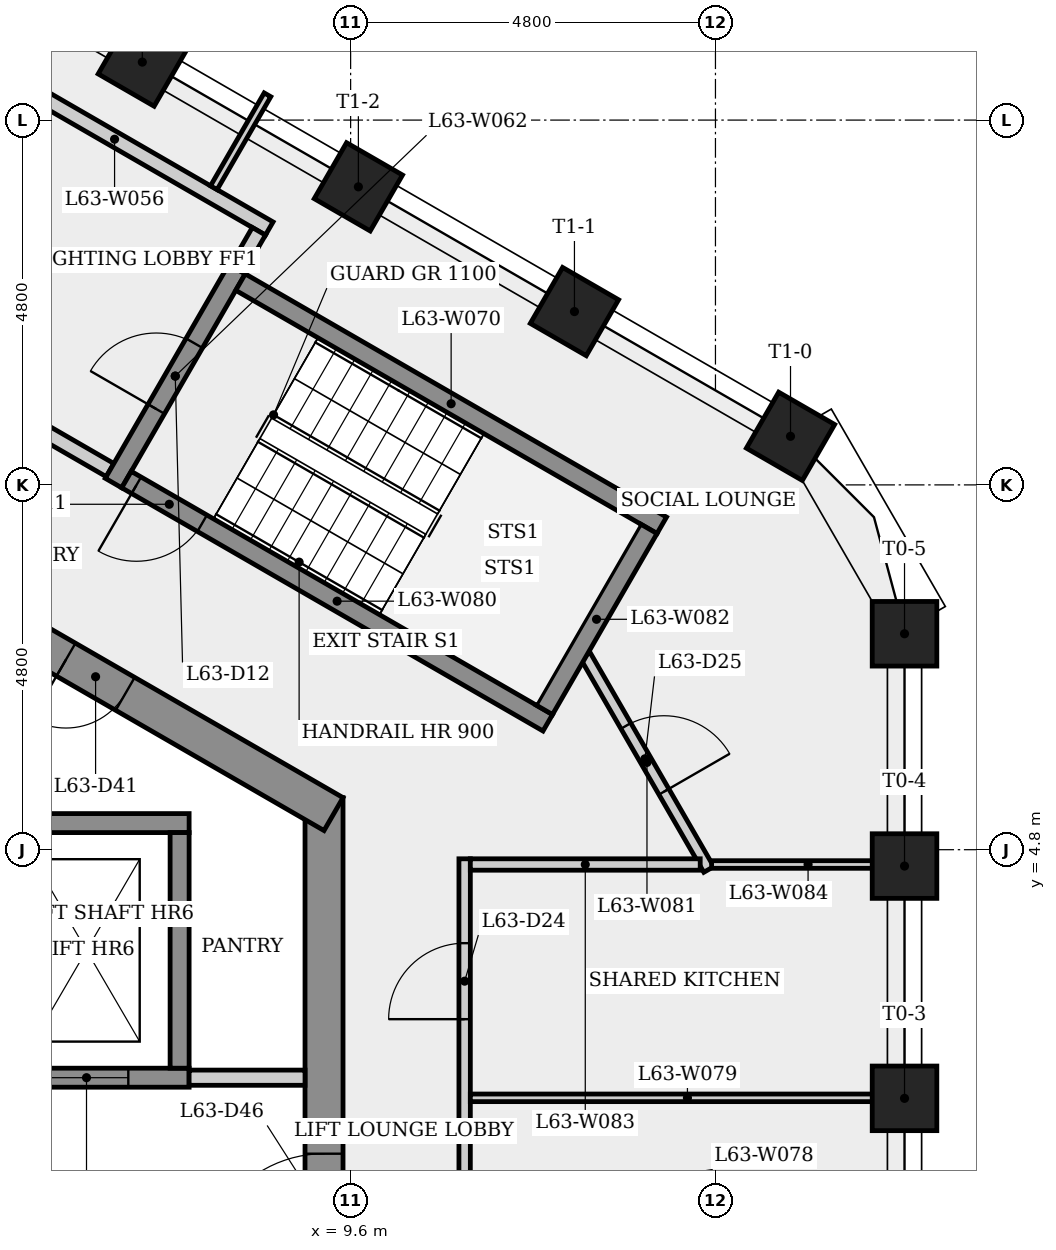
"""IFC4 building model, lengths in metres.
Left out: names, types, materials, properties, quantities, classifications, styles, units other than length and angle.
Written with IfcOpenShell. Run it as: python <this file> out.ifc"""

import sys

from ifc_helpers import new_model, si_unit, direction, frame, frame_2d, origin, origin_2d, place, context, subcontext, project, spatial, rectangle, extrude, element, fill, save


model = new_model("IFC4")
c1 = context("Model", 3, precision=1e-05, world=origin(), true_north=direction((0.0, 1.0)))
c2 = subcontext(c1, "Body", "Model", "MODEL_VIEW")
j1 = project(units=[si_unit("LENGTHUNIT", "METRE"), si_unit("PLANEANGLEUNIT", "RADIAN")], contexts=[c1])
p1 = place(None, origin())
s1 = spatial("IfcSite", under=j1, at=p1, CompositionType="ELEMENT")
p2 = place(p1, origin())
s2 = spatial("IfcBuilding", under=s1, at=p2, CompositionType="ELEMENT")
p3 = place(p2, frame((0.0, 0.0, 235.9)))
s3 = spatial("IfcBuildingStorey", under=s2, at=p3, CompositionType="ELEMENT", Elevation=235.9)
p4 = place(p3, frame((9.25, -5.485, 0.0), z_axis=(0.0, 0.0, 1.0), x_axis=(0.0, 1.0, 0.0)))
e1 = element("IfcWall", 1, at=p4, inside=s3, PredefinedType="SHEAR", context=c2, shape_type="SweptSolid", body=[
    extrude(rectangle(XDim=10.97, YDim=0.5, at=frame_2d((5.485, 0.0))), origin(), (0.0, 0.0, 1.0), 3.4),
])
p5 = place(p4, frame((4.685, 0.0, 0.0)))
e2 = element("IfcOpeningElement", 2, at=p5, cuts=e1, PredefinedType="OPENING", context=c2, shape_type="SweptSolid", body=[
    extrude(rectangle(XDim=1.6, YDim=2.1, at=frame_2d((0.8, 1.05))), frame((0.0, 0.26, 0.0), z_axis=(0.0, -1.0, 0.0), x_axis=(1.0, 0.0, 0.0)), (0.0, 0.0, 1.0), 0.52),
])
p6 = place(p3, frame((9.375, 5.268, 0.0), z_axis=(0.0, 0.0, 1.0), x_axis=(-0.866023993627, 0.500002442456, 0.0)))
e3 = element("IfcWall", 3, at=p6, inside=s3, PredefinedType="SHEAR", context=c2, shape_type="SweptSolid", body=[
    extrude(rectangle(XDim=10.97, YDim=0.5, at=frame_2d((5.485, 0.0))), origin(), (0.0, 0.0, 1.0), 3.4),
])
p7 = place(p6, frame((8.383, 0.0, 0.0)))
e4 = element("IfcOpeningElement", 4, at=p7, cuts=e3, PredefinedType="OPENING", context=c2, shape_type="SweptSolid", body=[
    extrude(rectangle(XDim=0.9, YDim=2.1, at=frame_2d((0.45, 1.05))), frame((0.0, 0.26, 0.0), z_axis=(0.0, -1.0, 0.0), x_axis=(1.0, 0.0, 0.0)), (0.0, 0.0, 1.0), 0.52),
])
p8 = place(p6, frame((3.165, 0.0, 0.0)))
e5 = element("IfcOpeningElement", 5, at=p8, cuts=e3, PredefinedType="OPENING", context=c2, shape_type="SweptSolid", body=[
    extrude(rectangle(XDim=0.9, YDim=2.1, at=frame_2d((0.45, 1.05))), frame((0.0, 0.26, 0.0), z_axis=(0.0, -1.0, 0.0), x_axis=(1.0, 0.0, 0.0)), (0.0, 0.0, 1.0), 0.52),
])
for number, where, z_axis, x_axis in (
    (6, (16.887, 1.528, 0.0), (0.0, 0.0, 1.0), (1.0, 0.0, 0.0)),
    (7, (16.887, 4.585, 0.0), (0.0, 0.0, 1.0), (1.0, 0.0, 0.0)),
    (8, (16.887, 7.641, 0.0), (0.0, 0.0, 1.0), (1.0, 0.0, 0.0)),
    (9, (15.387, 10.239, 0.0), (0.0, 0.0, 1.0), (0.5, 0.866, 0.0)),
    (10, (12.545, 11.88, 0.0), (0.0, 0.0, 1.0), (0.5, 0.866, 0.0)),
    (11, (9.702, 13.522, 0.0), (0.0, 0.0, 1.0), (0.5, 0.866, 0.0)),
    (12, (6.859, 15.163, 0.0), (0.0, 0.0, 1.0), (0.5, 0.866, 0.0)),
):
    element("IfcColumn", number, at=place(p3, frame(where, z_axis=z_axis, x_axis=x_axis)), inside=s3, PredefinedType="COLUMN", context=c2, shape_type="SweptSolid", body=[
        extrude(rectangle(XDim=0.85, YDim=0.85, at=origin_2d()), origin(), (0.0, 0.0, 1.0), 3.4),
    ])
p9 = place(p3, frame((-7.475, 1.8, 0.0), z_axis=(0.0, 0.0, 1.0), x_axis=(1.0, 0.0, 0.0)))
e13 = element("IfcWall", 13, at=p9, inside=s3, PredefinedType="SHEAR", context=c2, shape_type="SweptSolid", body=[
    extrude(rectangle(XDim=14.95, YDim=0.25, at=frame_2d((7.475, 0.0))), origin(), (0.0, 0.0, 1.0), 3.05),
])
p10 = place(p9, frame((0.8, 0.0, 0.0)))
e14 = element("IfcOpeningElement", 14, at=p10, cuts=e13, PredefinedType="OPENING", context=c2, shape_type="SweptSolid", body=[
    extrude(rectangle(XDim=1.1, YDim=2.1, at=frame_2d((0.55, 1.05))), frame((0.0, 0.135, 0.0), z_axis=(0.0, -1.0, 0.0), x_axis=(1.0, 0.0, 0.0)), (0.0, 0.0, 1.0), 0.27),
])
p11 = place(p9, frame((3.25, 0.0, 0.0)))
e15 = element("IfcOpeningElement", 15, at=p11, cuts=e13, PredefinedType="OPENING", context=c2, shape_type="SweptSolid", body=[
    extrude(rectangle(XDim=1.1, YDim=2.1, at=frame_2d((0.55, 1.05))), frame((0.0, 0.135, 0.0), z_axis=(0.0, -1.0, 0.0), x_axis=(1.0, 0.0, 0.0)), (0.0, 0.0, 1.0), 0.27),
])
p12 = place(p9, frame((5.7, 0.0, 0.0)))
e16 = element("IfcOpeningElement", 16, at=p12, cuts=e13, PredefinedType="OPENING", context=c2, shape_type="SweptSolid", body=[
    extrude(rectangle(XDim=1.1, YDim=2.1, at=frame_2d((0.55, 1.05))), frame((0.0, 0.135, 0.0), z_axis=(0.0, -1.0, 0.0), x_axis=(1.0, 0.0, 0.0)), (0.0, 0.0, 1.0), 0.27),
])
p13 = place(p9, frame((8.15, 0.0, 0.0)))
e17 = element("IfcOpeningElement", 17, at=p13, cuts=e13, PredefinedType="OPENING", context=c2, shape_type="SweptSolid", body=[
    extrude(rectangle(XDim=1.1, YDim=2.1, at=frame_2d((0.55, 1.05))), frame((0.0, 0.135, 0.0), z_axis=(0.0, -1.0, 0.0), x_axis=(1.0, 0.0, 0.0)), (0.0, 0.0, 1.0), 0.27),
])
p14 = place(p9, frame((10.6, 0.0, 0.0)))
e18 = element("IfcOpeningElement", 18, at=p14, cuts=e13, PredefinedType="OPENING", context=c2, shape_type="SweptSolid", body=[
    extrude(rectangle(XDim=1.1, YDim=2.1, at=frame_2d((0.55, 1.05))), frame((0.0, 0.135, 0.0), z_axis=(0.0, -1.0, 0.0), x_axis=(1.0, 0.0, 0.0)), (0.0, 0.0, 1.0), 0.27),
])
p15 = place(p9, frame((13.05, 0.0, 0.0)))
e19 = element("IfcOpeningElement", 19, at=p15, cuts=e13, PredefinedType="OPENING", context=c2, shape_type="SweptSolid", body=[
    extrude(rectangle(XDim=1.1, YDim=2.1, at=frame_2d((0.55, 1.05))), frame((0.0, 0.135, 0.0), z_axis=(0.0, -1.0, 0.0), x_axis=(1.0, 0.0, 0.0)), (0.0, 0.0, 1.0), 0.27),
])
p16 = place(p3, frame((-7.225, 5.15, 0.0), z_axis=(0.0, 0.0, 1.0), x_axis=(1.0, 0.0, 0.0)))
e20 = element("IfcWall", 20, at=p16, inside=s3, PredefinedType="SHEAR", context=c2, shape_type="SweptSolid", body=[
    extrude(rectangle(XDim=14.7, YDim=0.25, at=frame_2d((7.35, 0.0))), origin(), (0.0, 0.0, 1.0), 3.05),
])
p17 = place(p3, frame((4.459, 15.323, 0.0), z_axis=(0.0, 0.0, 1.0), x_axis=(0.866016039709, -0.500016218704, 0.0)))
e21 = element("IfcWall", 21, at=p17, inside=s3, PredefinedType="PARTITIONING", context=c2, shape_type="SweptSolid", body=[
    extrude(rectangle(XDim=4.7, YDim=0.2, at=frame_2d((2.35, 0.0))), origin(), (0.0, 0.0, 1.0), 3.05),
])
p18 = place(p3, frame((6.435, 9.795, 0.0), z_axis=(0.0, 0.0, 1.0), x_axis=(-0.866012907634, 0.500021643343, 0.0)))
e22 = element("IfcWall", 22, at=p18, inside=s3, PredefinedType="PARTITIONING", context=c2, shape_type="SweptSolid", body=[
    extrude(rectangle(XDim=4.45, YDim=0.2, at=frame_2d((2.225, 0.0))), origin(), (0.0, 0.0, 1.0), 3.05),
])
p19 = place(p18, frame((1.675, 0.0, 0.0)))
e23 = element("IfcOpeningElement", 23, at=p19, cuts=e22, PredefinedType="OPENING", context=c2, shape_type="SweptSolid", body=[
    extrude(rectangle(XDim=1.1, YDim=2.1, at=frame_2d((0.55, 1.05))), frame((0.0, 0.11, 0.0), z_axis=(0.0, -1.0, 0.0), x_axis=(1.0, 0.0, 0.0)), (0.0, 0.0, 1.0), 0.22),
])
p20 = place(p3, frame((6.48, 9.624, 0.0), z_axis=(0.0, 0.0, 1.0), x_axis=(0.500017246033, 0.866015446554, 0.0)))
e24 = element("IfcWall", 24, at=p20, inside=s3, PredefinedType="SHEAR", context=c2, shape_type="SweptSolid", body=[
    extrude(rectangle(XDim=3.25, YDim=0.25, at=frame_2d((1.625, 0.0))), origin(), (0.0, 0.0, 1.0), 3.05),
])
p21 = place(p20, frame((1.125, 0.0, 0.0)))
e25 = element("IfcOpeningElement", 25, at=p21, cuts=e24, PredefinedType="OPENING", context=c2, shape_type="SweptSolid", body=[
    extrude(rectangle(XDim=1.0, YDim=2.1, at=frame_2d((0.5, 1.05))), frame((0.0, 0.135, 0.0), z_axis=(0.0, -1.0, 0.0), x_axis=(1.0, 0.0, 0.0)), (0.0, 0.0, 1.0), 0.27),
])
p22 = place(p3, frame((7.475, 1.8, 0.0), z_axis=(0.0, 0.0, 1.0), x_axis=(1.0, 0.0, 0.0)))
e26 = element("IfcWall", 26, at=p22, inside=s3, PredefinedType="PARTITIONING", context=c2, shape_type="SweptSolid", body=[
    extrude(rectangle(XDim=1.525, YDim=0.2, at=frame_2d((0.763, 0.0))), origin(), (0.0, 0.0, 1.0), 3.05),
])
p23 = place(p3, frame((7.35, 5.025, 0.0), z_axis=(0.0, 0.0, 1.0), x_axis=(0.0, -1.0, 0.0)))
e27 = element("IfcWall", 27, at=p23, inside=s3, PredefinedType="SHEAR", context=c2, shape_type="SweptSolid", body=[
    extrude(rectangle(XDim=3.1, YDim=0.25, at=frame_2d((1.55, 0.0))), origin(), (0.0, 0.0, 1.0), 3.4),
])
p24 = place(p3, frame((7.8, 13.51, 0.0), z_axis=(0.0, 0.0, 1.0), x_axis=(0.499951990857, 0.866053120102, 0.0)))
e28 = element("IfcWall", 28, at=p24, inside=s3, PredefinedType="PARTITIONING", context=c2, shape_type="SweptSolid", body=[
    extrude(rectangle(XDim=1.412, YDim=0.1, at=frame_2d((0.706, 0.0))), origin(), (0.0, 0.0, 1.0), 3.05),
])
p25 = place(p3, frame((8.151, 12.268, 0.0), z_axis=(0.0, 0.0, 1.0), x_axis=(0.866025499775, -0.499999833739, 0.0)))
e29 = element("IfcWall", 29, at=p25, inside=s3, PredefinedType="SHEAR", context=c2, shape_type="SweptSolid", body=[
    extrude(rectangle(XDim=6.4, YDim=0.25, at=frame_2d((3.2, 0.0))), origin(), (0.0, 0.0, 1.0), 3.05),
])
p26 = place(p3, frame((8.393, 12.937, 0.0), z_axis=(0.0, 0.0, 1.0), x_axis=(-0.500065409566, -0.86598763626, 0.0)))
e30 = element("IfcWall", 30, at=p26, inside=s3, PredefinedType="PARTITIONING", context=c2, shape_type="SweptSolid", body=[
    extrude(rectangle(XDim=0.575, YDim=0.2, at=frame_2d((0.288, 0.0))), origin(), (0.0, 0.0, 1.0), 3.05),
])
p27 = place(p3, frame((11.1, -4.53, 0.0), z_axis=(0.0, 0.0, 1.0), x_axis=(0.0, 1.0, 0.0)))
e31 = element("IfcWall", 31, at=p27, inside=s3, PredefinedType="PARTITIONING", context=c2, shape_type="SweptSolid", body=[
    extrude(rectangle(XDim=9.21, YDim=0.15, at=frame_2d((4.605, 0.0))), origin(), (0.0, 0.0, 1.0), 3.05),
])
p28 = place(p27, frame((0.983, 0.0, 0.0)))
e32 = element("IfcOpeningElement", 32, at=p28, cuts=e31, PredefinedType="OPENING", context=c2, shape_type="SweptSolid", body=[
    extrude(rectangle(XDim=1.0, YDim=2.1, at=frame_2d((0.5, 1.05))), frame((0.0, 0.085, 0.0), z_axis=(0.0, -1.0, 0.0), x_axis=(1.0, 0.0, 0.0)), (0.0, 0.0, 1.0), 0.17),
])
p29 = place(p27, frame((4.03, 0.0, 0.0)))
e33 = element("IfcOpeningElement", 33, at=p29, cuts=e31, PredefinedType="OPENING", context=c2, shape_type="SweptSolid", body=[
    extrude(rectangle(XDim=1.0, YDim=2.1, at=frame_2d((0.5, 1.05))), frame((0.0, 0.085, 0.0), z_axis=(0.0, -1.0, 0.0), x_axis=(1.0, 0.0, 0.0)), (0.0, 0.0, 1.0), 0.17),
])
p30 = place(p27, frame((7.1, 0.0, 0.0)))
e34 = element("IfcOpeningElement", 34, at=p30, cuts=e31, PredefinedType="OPENING", context=c2, shape_type="SweptSolid", body=[
    extrude(rectangle(XDim=1.0, YDim=2.1, at=frame_2d((0.5, 1.05))), frame((0.0, 0.085, 0.0), z_axis=(0.0, -1.0, 0.0), x_axis=(1.0, 0.0, 0.0)), (0.0, 0.0, 1.0), 0.17),
])
p31 = place(p3, frame((11.175, 1.535, 0.0), z_axis=(0.0, 0.0, 1.0), x_axis=(1.0, 0.0, 0.0)))
e35 = element("IfcWall", 35, at=p31, inside=s3, PredefinedType="PARTITIONING", context=c2, shape_type="SweptSolid", body=[
    extrude(rectangle(XDim=5.712, YDim=0.1, at=frame_2d((2.856, 0.0))), origin(), (0.0, 0.0, 1.0), 3.05),
])
p32 = place(p3, frame((12.194, 6.47, 0.0), z_axis=(0.0, 0.0, 1.0), x_axis=(-0.866025499775, 0.499999833739, 0.0)))
e36 = element("IfcWall", 36, at=p32, inside=s3, PredefinedType="SHEAR", context=c2, shape_type="SweptSolid", body=[
    extrude(rectangle(XDim=6.4, YDim=0.25, at=frame_2d((3.2, 0.0))), origin(), (0.0, 0.0, 1.0), 3.05),
])
p33 = place(p32, frame((5.25, 0.0, 0.0)))
e37 = element("IfcOpeningElement", 37, at=p33, cuts=e36, PredefinedType="OPENING", context=c2, shape_type="SweptSolid", body=[
    extrude(rectangle(XDim=1.0, YDim=2.1, at=frame_2d((0.5, 1.05))), frame((0.0, 0.135, 0.0), z_axis=(0.0, -1.0, 0.0), x_axis=(1.0, 0.0, 0.0)), (0.0, 0.0, 1.0), 0.27),
])
p34 = place(p3, frame((12.686, 7.356, 0.0), z_axis=(0.0, 0.0, 1.0), x_axis=(0.500047413384, -0.865998027924, 0.0)))
e38 = element("IfcWall", 38, at=p34, inside=s3, PredefinedType="PARTITIONING", context=c2, shape_type="SweptSolid", body=[
    extrude(rectangle(XDim=3.252, YDim=0.15, at=frame_2d((1.626, 0.0))), origin(), (0.0, 0.0, 1.0), 3.05),
])
p35 = place(p34, frame((1.071, 0.0, 0.0)))
e39 = element("IfcOpeningElement", 39, at=p35, cuts=e38, PredefinedType="OPENING", context=c2, shape_type="SweptSolid", body=[
    extrude(rectangle(XDim=1.0, YDim=2.1, at=frame_2d((0.5, 1.05))), frame((0.0, 0.085, 0.0), z_axis=(0.0, -1.0, 0.0), x_axis=(1.0, 0.0, 0.0)), (0.0, 0.0, 1.0), 0.17),
])
p36 = place(p3, frame((12.148, 6.641, 0.0), z_axis=(0.0, 0.0, 1.0), x_axis=(0.500034990121, 0.866005201286, 0.0)))
e40 = element("IfcWall", 40, at=p36, inside=s3, PredefinedType="SHEAR", context=c2, shape_type="SweptSolid", body=[
    extrude(rectangle(XDim=2.75, YDim=0.25, at=frame_2d((1.375, 0.0))), origin(), (0.0, 0.0, 1.0), 3.05),
])
p37 = place(p3, frame((14.199, 4.605, 0.0), z_axis=(0.0, 0.0, 1.0), x_axis=(-1.0, 0.0, 0.0)))
e41 = element("IfcWall", 41, at=p37, inside=s3, PredefinedType="PARTITIONING", context=c2, shape_type="SweptSolid", body=[
    extrude(rectangle(XDim=3.025, YDim=0.15, at=frame_2d((1.512, 0.0))), origin(), (0.0, 0.0, 1.0), 3.05),
])
p38 = place(p3, frame((14.349, 4.605, 0.0), z_axis=(0.0, 0.0, 1.0), x_axis=(1.0, 0.0, 0.0)))
e42 = element("IfcWall", 42, at=p38, inside=s3, PredefinedType="PARTITIONING", context=c2, shape_type="SweptSolid", body=[
    extrude(rectangle(XDim=2.538, YDim=0.1, at=frame_2d((1.269, 0.0))), origin(), (0.0, 0.0, 1.0), 3.05),
])
p39 = place(p15, origin())
e43 = element("IfcDoor", 43, at=p39, inside=s3, OperationType="SLIDING_TO_LEFT", PredefinedType="DOOR", context=c2, shape_type="SweptSolid", body=[
    extrude(rectangle(XDim=1.1, YDim=2.1, at=frame_2d((0.55, 1.05))), frame((0.0, 0.025, 0.0), z_axis=(0.0, -1.0, 0.0), x_axis=(1.0, 0.0, 0.0)), (0.0, 0.0, 1.0), 0.05),
])
fill(e19, e43)
p40 = place(p33, origin())
e44 = element("IfcDoor", 44, at=p40, inside=s3, OperationType="SINGLE_SWING_RIGHT", PredefinedType="DOOR", context=c2, shape_type="SweptSolid", body=[
    extrude(rectangle(XDim=1.0, YDim=2.1, at=frame_2d((0.5, 1.05))), frame((0.0, 0.025, 0.0), z_axis=(0.0, -1.0, 0.0), x_axis=(1.0, 0.0, 0.0)), (0.0, 0.0, 1.0), 0.05),
])
fill(e37, e44)
p41 = place(p21, origin())
e45 = element("IfcDoor", 45, at=p41, inside=s3, OperationType="SINGLE_SWING_LEFT", PredefinedType="DOOR", context=c2, shape_type="SweptSolid", body=[
    extrude(rectangle(XDim=1.0, YDim=2.1, at=frame_2d((0.5, 1.05))), frame((0.0, 0.025, 0.0), z_axis=(0.0, -1.0, 0.0), x_axis=(1.0, 0.0, 0.0)), (0.0, 0.0, 1.0), 0.05),
])
fill(e25, e45)
p42 = place(p30, origin())
e46 = element("IfcDoor", 46, at=p42, inside=s3, OperationType="SINGLE_SWING_LEFT", PredefinedType="DOOR", context=c2, shape_type="SweptSolid", body=[
    extrude(rectangle(XDim=1.0, YDim=2.1, at=frame_2d((0.5, 1.05))), frame((0.0, 0.025, 0.0), z_axis=(0.0, -1.0, 0.0), x_axis=(1.0, 0.0, 0.0)), (0.0, 0.0, 1.0), 0.05),
])
fill(e34, e46)
p43 = place(p35, origin())
e47 = element("IfcDoor", 47, at=p43, inside=s3, OperationType="SINGLE_SWING_RIGHT", PredefinedType="DOOR", context=c2, shape_type="SweptSolid", body=[
    extrude(rectangle(XDim=1.0, YDim=2.1, at=frame_2d((0.5, 1.05))), frame((0.0, 0.025, 0.0), z_axis=(0.0, -1.0, 0.0), x_axis=(1.0, 0.0, 0.0)), (0.0, 0.0, 1.0), 0.05),
])
fill(e39, e47)
p44 = place(p8, origin())
e48 = element("IfcDoor", 48, at=p44, inside=s3, OperationType="SINGLE_SWING_RIGHT", PredefinedType="DOOR", context=c2, shape_type="SweptSolid", body=[
    extrude(rectangle(XDim=0.9, YDim=2.1, at=frame_2d((0.45, 1.05))), frame((0.0, 0.025, 0.0), z_axis=(0.0, -1.0, 0.0), x_axis=(1.0, 0.0, 0.0)), (0.0, 0.0, 1.0), 0.05),
])
fill(e5, e48)
p45 = place(p5, origin())
e49 = element("IfcDoor", 49, at=p45, inside=s3, OperationType="SINGLE_SWING_LEFT", PredefinedType="DOOR", context=c2, shape_type="SweptSolid", body=[
    extrude(rectangle(XDim=1.6, YDim=2.1, at=frame_2d((0.8, 1.05))), frame((0.0, 0.025, 0.0), z_axis=(0.0, -1.0, 0.0), x_axis=(1.0, 0.0, 0.0)), (0.0, 0.0, 1.0), 0.05),
])
fill(e2, e49)
save(model, sys.argv[1])
